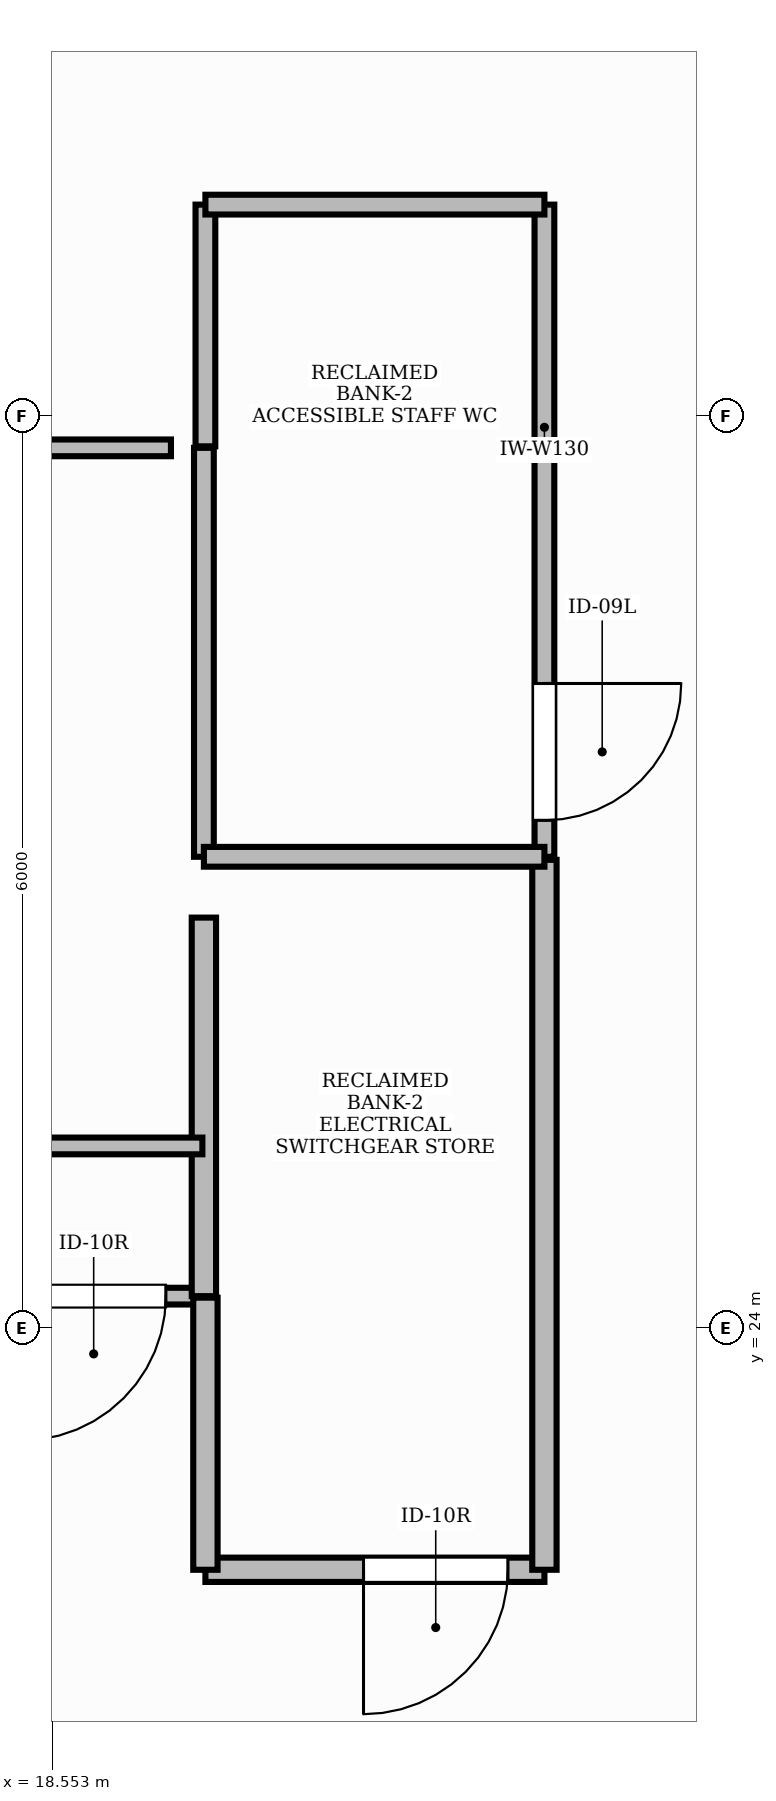
"""IFC4 building model, lengths in metres.
Left out: names, types, materials, properties, quantities, classifications, styles, units other than length and angle.
Written with IfcOpenShell. Run it as: python <this file> out.ifc"""

import sys

from ifc_helpers import new_model, si_unit, direction, frame, frame_2d, origin, place, context, subcontext, project, spatial, rectangle, extrude, element, fill, save


model = new_model("IFC4")
c1 = context("Model", 3, precision=1e-05, world=origin(), true_north=direction((0.0, 1.0)))
c2 = subcontext(c1, "Body", "Model", "MODEL_VIEW")
j1 = project(units=[si_unit("LENGTHUNIT", "METRE"), si_unit("PLANEANGLEUNIT", "RADIAN")], contexts=[c1])
p1 = place(None, origin())
s1 = spatial("IfcSite", under=j1, at=p1, CompositionType="ELEMENT")
p2 = place(p1, origin())
s2 = spatial("IfcBuilding", under=s1, at=p2, CompositionType="ELEMENT")
p3 = place(p2, frame((0.0, 0.0, 282.6)))
s3 = spatial("IfcBuildingStorey", under=s2, at=p3, CompositionType="ELEMENT", Elevation=282.6)
p4 = place(p3, frame((21.79, 22.41, 0.0), z_axis=(0.0, 0.0, 1.0), x_axis=(-1.0, 0.0, 0.0)))
e1 = element("IfcWall", 1, at=p4, inside=s3, PredefinedType="PARTITIONING", context=c2, shape_type="SweptSolid", body=[
    extrude(rectangle(XDim=2.23, YDim=0.16, at=frame_2d((1.115, 0.0))), origin(), (0.0, 0.0, 1.0), 2.8),
])
p5 = place(p4, frame((0.24, 0.0, 0.0)))
e2 = element("IfcOpeningElement", 2, at=p5, cuts=e1, PredefinedType="OPENING", context=c2, shape_type="SweptSolid", body=[
    extrude(rectangle(XDim=0.95, YDim=2.15, at=frame_2d((0.475, 1.075))), frame((0.0, 0.095, 0.0), z_axis=(0.0, -1.0, 0.0), x_axis=(1.0, 0.0, 0.0)), (0.0, 0.0, 1.0), 0.19),
])
p6 = place(p3, frame((21.79, 31.39, 0.0), z_axis=(0.0, 0.0, 1.0), x_axis=(0.0, -1.0, 0.0)))
e3 = element("IfcWall", 3, at=p6, inside=s3, PredefinedType="PARTITIONING", context=c2, shape_type="SweptSolid", body=[
    extrude(rectangle(XDim=4.29, YDim=0.13, at=frame_2d((2.145, 0.0))), origin(), (0.0, 0.0, 1.0), 2.8),
])
p7 = place(p6, frame((3.15, 0.0, 0.0)))
e4 = element("IfcOpeningElement", 4, at=p7, cuts=e3, PredefinedType="OPENING", context=c2, shape_type="SweptSolid", body=[
    extrude(rectangle(XDim=0.9, YDim=2.15, at=frame_2d((0.45, 1.075))), frame((0.0, 0.08, 0.0), z_axis=(0.0, -1.0, 0.0), x_axis=(1.0, 0.0, 0.0)), (0.0, 0.0, 1.0), 0.16),
])
p8 = place(p3, frame((19.54, 24.21, 0.0), z_axis=(0.0, 0.0, 1.0), x_axis=(-1.0, 0.0, 0.0)))
e5 = element("IfcWall", 5, at=p8, inside=s3, PredefinedType="MOVABLE", context=c2, shape_type="SweptSolid", body=[
    extrude(rectangle(XDim=4.74, YDim=0.11, at=frame_2d((2.37, 0.0))), origin(), (0.0, 0.0, 1.0), 2.8),
])
p9 = place(p8, frame((0.24, 0.0, 0.0)))
e6 = element("IfcOpeningElement", 6, at=p9, cuts=e5, PredefinedType="OPENING", context=c2, shape_type="SweptSolid", body=[
    extrude(rectangle(XDim=0.95, YDim=2.15, at=frame_2d((0.475, 1.075))), frame((0.0, 0.07, 0.0), z_axis=(0.0, -1.0, 0.0), x_axis=(1.0, 0.0, 0.0)), (0.0, 0.0, 1.0), 0.14),
])
p10 = place(p3, frame((14.8, 29.79, 0.0), z_axis=(0.0, 0.0, 1.0), x_axis=(1.0, 0.0, 0.0)))
e7 = element("IfcWall", 7, at=p10, inside=s3, PredefinedType="MOVABLE", context=c2, shape_type="SweptSolid", body=[
    extrude(rectangle(XDim=4.533, YDim=0.11, at=frame_2d((2.267, 0.0))), origin(), (0.0, 0.0, 1.0), 2.8),
])
p11 = place(p10, frame((0.502, 0.0, 0.0)))
e8 = element("IfcOpeningElement", 8, at=p11, cuts=e7, PredefinedType="OPENING", context=c2, shape_type="SweptSolid", body=[
    extrude(rectangle(XDim=0.95, YDim=2.15, at=frame_2d((0.475, 1.075))), frame((0.0, 0.07, 0.0), z_axis=(0.0, -1.0, 0.0), x_axis=(1.0, 0.0, 0.0)), (0.0, 0.0, 1.0), 0.14),
])
p12 = place(p3, frame((21.79, 27.08, 0.0), z_axis=(0.0, 0.0, 1.0), x_axis=(0.0, -1.0, 0.0)))
e9 = element("IfcWall", 9, at=p12, inside=s3, PredefinedType="PARTITIONING", context=c2, shape_type="SweptSolid", body=[
    extrude(rectangle(XDim=4.67, YDim=0.16, at=frame_2d((2.335, 0.0))), origin(), (0.0, 0.0, 1.0), 2.8),
])
p13 = place(p3, frame((19.56, 22.41, 0.0), z_axis=(0.0, 0.0, 1.0), x_axis=(0.0, 1.0, 0.0)))
e10 = element("IfcWall", 10, at=p13, inside=s3, PredefinedType="PARTITIONING", context=c2, shape_type="SweptSolid", body=[
    extrude(rectangle(XDim=1.79, YDim=0.16, at=frame_2d((0.895, 0.0))), origin(), (0.0, 0.0, 1.0), 2.8),
])
p14 = place(p3, frame((19.55, 24.21, 0.0), z_axis=(0.0, 0.0, 1.0), x_axis=(0.0, 1.0, 0.0)))
e11 = element("IfcWall", 11, at=p14, inside=s3, PredefinedType="PARTITIONING", context=c2, shape_type="SweptSolid", body=[
    extrude(rectangle(XDim=2.49, YDim=0.16, at=frame_2d((1.245, 0.0))), origin(), (0.0, 0.0, 1.0), 2.8),
])
p15 = place(p3, frame((19.55, 27.1, 0.0), z_axis=(0.0, 0.0, 1.0), x_axis=(0.0, 1.0, 0.0)))
e12 = element("IfcWall", 12, at=p15, inside=s3, PredefinedType="PARTITIONING", context=c2, shape_type="SweptSolid", body=[
    extrude(rectangle(XDim=2.69, YDim=0.13, at=frame_2d((1.345, 0.0))), origin(), (0.0, 0.0, 1.0), 2.8),
])
p16 = place(p3, frame((19.56, 29.8, 0.0), z_axis=(0.0, 0.0, 1.0), x_axis=(0.0, 1.0, 0.0)))
e13 = element("IfcWall", 13, at=p16, inside=s3, PredefinedType="PARTITIONING", context=c2, shape_type="SweptSolid", body=[
    extrude(rectangle(XDim=1.59, YDim=0.13, at=frame_2d((0.795, 0.0))), origin(), (0.0, 0.0, 1.0), 2.8),
])
p17 = place(p3, frame((19.56, 31.39, 0.0), z_axis=(0.0, 0.0, 1.0), x_axis=(1.0, 0.0, 0.0)))
e14 = element("IfcWall", 14, at=p17, inside=s3, PredefinedType="PARTITIONING", context=c2, shape_type="SweptSolid", body=[
    extrude(rectangle(XDim=2.23, YDim=0.13, at=frame_2d((1.115, 0.0))), origin(), (0.0, 0.0, 1.0), 2.8),
])
p18 = place(p3, frame((21.79, 27.1, 0.0), z_axis=(0.0, 0.0, 1.0), x_axis=(-1.0, 0.0, 0.0)))
e15 = element("IfcWall", 15, at=p18, inside=s3, PredefinedType="PARTITIONING", context=c2, shape_type="SweptSolid", body=[
    extrude(rectangle(XDim=2.24, YDim=0.13, at=frame_2d((1.12, 0.0))), origin(), (0.0, 0.0, 1.0), 2.8),
])
p19 = place(p3, frame((10.317, 25.198, 0.0), z_axis=(0.0, 0.0, 1.0), x_axis=(1.0, 0.0, 0.0)))
e16 = element("IfcWall", 16, at=p19, inside=s3, PredefinedType="MOVABLE", context=c2, shape_type="SweptSolid", body=[
    extrude(rectangle(XDim=9.223, YDim=0.11, at=frame_2d((4.612, 0.0))), origin(), (0.0, 0.0, 1.0), 2.8),
])
p20 = place(p5, origin())
e17 = element("IfcDoor", 17, at=p20, inside=s3, OperationType="SINGLE_SWING_RIGHT", PredefinedType="DOOR", context=c2, shape_type="SweptSolid", body=[
    extrude(rectangle(XDim=0.95, YDim=2.15, at=frame_2d((0.475, 1.075))), frame((0.0, 0.025, 0.0), z_axis=(0.0, -1.0, 0.0), x_axis=(1.0, 0.0, 0.0)), (0.0, 0.0, 1.0), 0.05),
])
fill(e2, e17)
p21 = place(p7, origin())
e18 = element("IfcDoor", 18, at=p21, inside=s3, OperationType="SINGLE_SWING_LEFT", PredefinedType="DOOR", context=c2, shape_type="SweptSolid", body=[
    extrude(rectangle(XDim=0.9, YDim=2.15, at=frame_2d((0.45, 1.075))), frame((0.0, 0.025, 0.0), z_axis=(0.0, -1.0, 0.0), x_axis=(1.0, 0.0, 0.0)), (0.0, 0.0, 1.0), 0.05),
])
fill(e4, e18)
p22 = place(p9, origin())
e19 = element("IfcDoor", 19, at=p22, inside=s3, OperationType="SINGLE_SWING_RIGHT", PredefinedType="DOOR", context=c2, shape_type="SweptSolid", body=[
    extrude(rectangle(XDim=0.95, YDim=2.15, at=frame_2d((0.475, 1.075))), frame((0.0, 0.025, 0.0), z_axis=(0.0, -1.0, 0.0), x_axis=(1.0, 0.0, 0.0)), (0.0, 0.0, 1.0), 0.05),
])
fill(e6, e19)
save(model, sys.argv[1])
